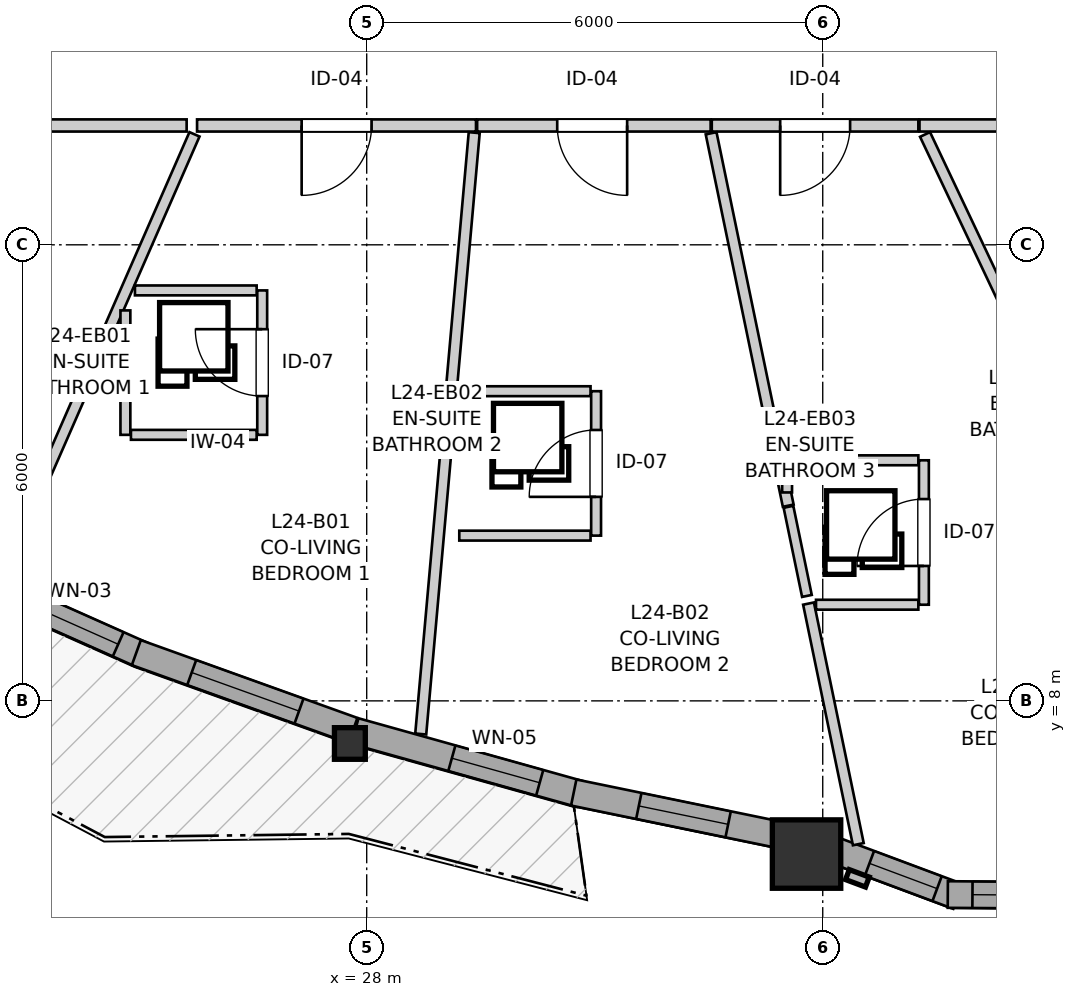
"""IFC4 building model, lengths in metres.
Left out: names, types, materials, properties, quantities, classifications, styles, units other than length and angle.
Written with IfcOpenShell. Run it as: python <this file> out.ifc"""

import sys

from ifc_helpers import new_model, si_unit, direction, frame, frame_2d, origin, origin_2d, place, context, subcontext, project, spatial, rectangle, i_section, extrude, source, transform, mapped, element, fill, save


model = new_model("IFC4")
c1 = context("Model", 3, precision=1e-05, world=origin(), true_north=direction((0.0, 1.0)))
c2 = subcontext(c1, "Body", "Model", "MODEL_VIEW")
j1 = project(units=[si_unit("LENGTHUNIT", "METRE"), si_unit("PLANEANGLEUNIT", "RADIAN")], contexts=[c1])
p1 = place(None, origin())
s1 = spatial("IfcSite", under=j1, at=p1, CompositionType="ELEMENT")
p2 = place(p1, origin())
s2 = spatial("IfcBuilding", under=s1, at=p2, CompositionType="ELEMENT")
p3 = place(p2, frame((0.0, 0.0, 83.2)))
s3 = spatial("IfcBuildingStorey", under=s2, at=p3, CompositionType="ELEMENT", Elevation=83.2)
m1 = source(origin(), c2, "Body", "SweptSolid", [
    extrude(i_section(OverallWidth=0.406, OverallDepth=0.416, WebThickness=0.027, FlangeThickness=0.044, FilletRadius=0.015, at=origin_2d()), origin(), (0.0, 0.0, 1.0), 2.935),
])
p4 = place(p3, frame((27.779, 7.439, 0.0), z_axis=(0.0, 0.0, 1.0), x_axis=(1.0, 0.0, 0.0)))
e1 = element("IfcColumn", 1, at=p4, inside=s3, PredefinedType="PILASTER", context=c2, shape_type="MappedRepresentation", body=[
    mapped(m1, transform((0.0, 0.0, 0.0), x_axis=(1.0, 0.0, 0.0), y_axis=(0.0, 1.0, 0.0), z_axis=(0.0, 0.0, 1.0), scale=1.0)),
])
m2 = source(origin(), c2, "Body", "SweptSolid", [
    extrude(rectangle(XDim=0.9, YDim=0.9, at=origin_2d()), origin(), (0.0, 0.0, 1.0), 2.935),
])
p5 = place(p3, frame((33.787, 5.985, 0.0), z_axis=(0.0, 0.0, 1.0), x_axis=(1.0, 0.0, 0.0)))
e2 = element("IfcColumn", 2, at=p5, inside=s3, PredefinedType="COLUMN", context=c2, shape_type="MappedRepresentation", body=[
    mapped(m2, transform((0.0, 0.0, 0.0), x_axis=(1.0, 0.0, 0.0), y_axis=(0.0, 1.0, 0.0), z_axis=(0.0, 0.0, 1.0), scale=1.0)),
])
p6 = place(p3, frame((22.503, 9.737, 0.0), z_axis=(0.0, 0.0, 1.0), x_axis=(0.913443049169, -0.406966578388, 0.0)))
e3 = element("IfcWall", 3, at=p6, inside=s3, PredefinedType="SOLIDWALL", context=c2, shape_type="SweptSolid", body=[
    extrude(rectangle(XDim=2.79, YDim=0.35, at=frame_2d((1.395, 0.0))), origin(), (0.0, 0.0, 1.0), 2.465),
])
p7 = place(p6, frame((0.938, 0.0, 0.82)))
e4 = element("IfcOpeningElement", 4, at=p7, cuts=e3, PredefinedType="OPENING", context=c2, shape_type="SweptSolid", body=[
    extrude(rectangle(XDim=1.5, YDim=1.45, at=frame_2d((0.75, 0.725))), frame((0.0, 0.185, 0.0), z_axis=(0.0, -1.0, 0.0), x_axis=(1.0, 0.0, 0.0)), (0.0, 0.0, 1.0), 0.37),
])
p8 = place(p3, frame((24.969, 8.635, 0.0), z_axis=(0.0, 0.0, 1.0), x_axis=(0.941099972293, -0.338128440315, 0.0)))
e5 = element("IfcWall", 5, at=p8, inside=s3, PredefinedType="SOLIDWALL", context=c2, shape_type="SweptSolid", body=[
    extrude(rectangle(XDim=3.028, YDim=0.35, at=frame_2d((1.514, 0.0))), origin(), (0.0, 0.0, 1.0), 2.465),
])
p9 = place(p8, frame((0.774, 0.0, 0.82)))
e6 = element("IfcOpeningElement", 6, at=p9, cuts=e5, PredefinedType="OPENING", context=c2, shape_type="SweptSolid", body=[
    extrude(rectangle(XDim=1.5, YDim=1.45, at=frame_2d((0.75, 0.725))), frame((0.0, 0.185, 0.0), z_axis=(0.0, -1.0, 0.0), x_axis=(1.0, 0.0, 0.0)), (0.0, 0.0, 1.0), 0.37),
])
p10 = place(p3, frame((27.845, 7.603, 0.0), z_axis=(0.0, 0.0, 1.0), x_axis=(0.963041412051, -0.269353371382, 0.0)))
e7 = element("IfcWall", 7, at=p10, inside=s3, PredefinedType="SOLIDWALL", context=c2, shape_type="SweptSolid", body=[
    extrude(rectangle(XDim=3.078, YDim=0.35, at=frame_2d((1.539, 0.0))), origin(), (0.0, 0.0, 1.0), 2.465),
])
p11 = place(p10, frame((1.324, 0.0, 0.82)))
e8 = element("IfcOpeningElement", 8, at=p11, cuts=e7, PredefinedType="OPENING", context=c2, shape_type="SweptSolid", body=[
    extrude(rectangle(XDim=1.2, YDim=1.45, at=frame_2d((0.6, 0.725))), frame((0.0, 0.185, 0.0), z_axis=(0.0, -1.0, 0.0), x_axis=(1.0, 0.0, 0.0)), (0.0, 0.0, 1.0), 0.37),
])
p12 = place(p3, frame((30.724, 6.794, 0.0), z_axis=(0.0, 0.0, 1.0), x_axis=(0.979439663571, -0.201737317878, 0.0)))
e9 = element("IfcWall", 9, at=p12, inside=s3, PredefinedType="SOLIDWALL", context=c2, shape_type="SweptSolid", body=[
    extrude(rectangle(XDim=2.938, YDim=0.35, at=frame_2d((1.469, 0.0))), origin(), (0.0, 0.0, 1.0), 2.465),
])
p13 = place(p12, frame((0.874, 0.0, 0.82)))
e10 = element("IfcOpeningElement", 10, at=p13, cuts=e9, PredefinedType="OPENING", context=c2, shape_type="SweptSolid", body=[
    extrude(rectangle(XDim=1.2, YDim=1.45, at=frame_2d((0.6, 0.725))), frame((0.0, 0.185, 0.0), z_axis=(0.0, -1.0, 0.0), x_axis=(1.0, 0.0, 0.0)), (0.0, 0.0, 1.0), 0.37),
])
p14 = place(p3, frame((34.059, 6.07, 0.0), z_axis=(0.0, 0.0, 1.0), x_axis=(0.936803747811, -0.349855310219, 0.0)))
e11 = element("IfcWall", 11, at=p14, inside=s3, PredefinedType="SOLIDWALL", context=c2, shape_type="SweptSolid", body=[
    extrude(rectangle(XDim=1.836, YDim=0.35, at=frame_2d((0.918, 0.0))), origin(), (0.0, 0.0, 1.0), 2.465),
])
p15 = place(p14, frame((0.593, 0.0, 0.82)))
e12 = element("IfcOpeningElement", 12, at=p15, cuts=e11, PredefinedType="OPENING", context=c2, shape_type="SweptSolid", body=[
    extrude(rectangle(XDim=0.95, YDim=1.35, at=frame_2d((0.475, 0.675))), frame((0.0, 0.185, 0.0), z_axis=(0.0, -1.0, 0.0), x_axis=(1.0, 0.0, 0.0)), (0.0, 0.0, 1.0), 0.37),
])
p16 = place(p3, frame((35.646, 5.452, 0.0), z_axis=(0.0, 0.0, 1.0), x_axis=(0.999976451414, -0.006862697526, 0.0)))
e13 = element("IfcWall", 13, at=p16, inside=s3, PredefinedType="SOLIDWALL", context=c2, shape_type="SweptSolid", body=[
    extrude(rectangle(XDim=2.099, YDim=0.35, at=frame_2d((1.049, 0.0))), origin(), (0.0, 0.0, 1.0), 2.465),
])
p17 = place(p16, frame((0.324, 0.0, 0.82)))
e14 = element("IfcOpeningElement", 14, at=p17, cuts=e13, PredefinedType="OPENING", context=c2, shape_type="SweptSolid", body=[
    extrude(rectangle(XDim=1.45, YDim=1.25, at=frame_2d((0.725, 0.625))), frame((0.0, 0.185, 0.0), z_axis=(0.0, -1.0, 0.0), x_axis=(1.0, 0.0, 0.0)), (0.0, 0.0, 1.0), 0.37),
])
p18 = place(p3, frame((29.438, 15.57, 0.0), z_axis=(0.0, 0.0, 1.0), x_axis=(-1.0, 0.0, 0.0)))
e15 = element("IfcWall", 15, at=p18, inside=s3, PredefinedType="PARTITIONING", context=c2, shape_type="SweptSolid", body=[
    extrude(rectangle(XDim=3.67, YDim=0.16, at=frame_2d((1.835, 0.0))), origin(), (0.0, 0.0, 1.0), 2.935),
])
p19 = place(p18, frame((1.374, 0.0, 0.0)))
e16 = element("IfcOpeningElement", 16, at=p19, cuts=e15, PredefinedType="OPENING", context=c2, shape_type="SweptSolid", body=[
    extrude(rectangle(XDim=0.92, YDim=2.1, at=frame_2d((0.46, 1.05))), frame((0.0, 0.09, 0.0), z_axis=(0.0, -1.0, 0.0), x_axis=(1.0, 0.0, 0.0)), (0.0, 0.0, 1.0), 0.18),
])
p20 = place(p3, frame((38.53, 15.57, 0.0), z_axis=(0.0, 0.0, 1.0), x_axis=(-1.0, 0.0, 0.0)))
e17 = element("IfcWall", 17, at=p20, inside=s3, PredefinedType="PARTITIONING", context=c2, shape_type="SweptSolid", body=[
    extrude(rectangle(XDim=3.257, YDim=0.16, at=frame_2d((1.628, 0.0))), origin(), (0.0, 0.0, 1.0), 2.935),
])
p21 = place(p20, frame((1.16, 0.0, 0.0)))
e18 = element("IfcOpeningElement", 18, at=p21, cuts=e17, PredefinedType="OPENING", context=c2, shape_type="SweptSolid", body=[
    extrude(rectangle(XDim=0.92, YDim=2.1, at=frame_2d((0.46, 1.05))), frame((0.0, 0.09, 0.0), z_axis=(0.0, -1.0, 0.0), x_axis=(1.0, 0.0, 0.0)), (0.0, 0.0, 1.0), 0.18),
])
p22 = place(p3, frame((32.525, 15.57, 0.0), z_axis=(0.0, 0.0, 1.0), x_axis=(-1.0, 0.0, 0.0)))
e19 = element("IfcWall", 19, at=p22, inside=s3, PredefinedType="PARTITIONING", context=c2, shape_type="SweptSolid", body=[
    extrude(rectangle(XDim=3.072, YDim=0.16, at=frame_2d((1.536, 0.0))), origin(), (0.0, 0.0, 1.0), 2.935),
])
p23 = place(p22, frame((1.098, 0.0, 0.0)))
e20 = element("IfcOpeningElement", 20, at=p23, cuts=e19, PredefinedType="OPENING", context=c2, shape_type="SweptSolid", body=[
    extrude(rectangle(XDim=0.92, YDim=2.1, at=frame_2d((0.46, 1.05))), frame((0.0, 0.09, 0.0), z_axis=(0.0, -1.0, 0.0), x_axis=(1.0, 0.0, 0.0)), (0.0, 0.0, 1.0), 0.18),
])
p24 = place(p3, frame((35.258, 15.57, 0.0), z_axis=(0.0, 0.0, 1.0), x_axis=(-1.0, 0.0, 0.0)))
e21 = element("IfcWall", 21, at=p24, inside=s3, PredefinedType="PARTITIONING", context=c2, shape_type="SweptSolid", body=[
    extrude(rectangle(XDim=2.718, YDim=0.16, at=frame_2d((1.359, 0.0))), origin(), (0.0, 0.0, 1.0), 2.935),
])
p25 = place(p24, frame((0.898, 0.0, 0.0)))
e22 = element("IfcOpeningElement", 22, at=p25, cuts=e21, PredefinedType="OPENING", context=c2, shape_type="SweptSolid", body=[
    extrude(rectangle(XDim=0.92, YDim=2.1, at=frame_2d((0.46, 1.05))), frame((0.0, 0.09, 0.0), z_axis=(0.0, -1.0, 0.0), x_axis=(1.0, 0.0, 0.0)), (0.0, 0.0, 1.0), 0.18),
])
p26 = place(p3, frame((26.625, 11.5, 0.0), z_axis=(0.0, 0.0, 1.0), x_axis=(0.0, 1.0, 0.0)))
e23 = element("IfcWall", 23, at=p26, inside=s3, PredefinedType="PARTITIONING", context=c2, shape_type="SweptSolid", body=[
    extrude(rectangle(XDim=1.9, YDim=0.13, at=frame_2d((0.95, 0.0))), origin(), (0.0, 0.0, 1.0), 2.935),
])
p27 = place(p26, frame((0.51, 0.0, 0.0)))
e24 = element("IfcOpeningElement", 24, at=p27, cuts=e23, PredefinedType="OPENING", context=c2, shape_type="SweptSolid", body=[
    extrude(rectangle(XDim=0.88, YDim=2.05, at=frame_2d((0.44, 1.025))), frame((0.0, 0.075, 0.0), z_axis=(0.0, -1.0, 0.0), x_axis=(1.0, 0.0, 0.0)), (0.0, 0.0, 1.0), 0.15),
])
p28 = place(p3, frame((31.018, 10.174, 0.0), z_axis=(0.0, 0.0, 1.0), x_axis=(0.0, 1.0, 0.0)))
e25 = element("IfcWall", 25, at=p28, inside=s3, PredefinedType="PARTITIONING", context=c2, shape_type="SweptSolid", body=[
    extrude(rectangle(XDim=1.9, YDim=0.13, at=frame_2d((0.95, 0.0))), origin(), (0.0, 0.0, 1.0), 2.935),
])
p29 = place(p28, frame((0.51, 0.0, 0.0)))
e26 = element("IfcOpeningElement", 26, at=p29, cuts=e25, PredefinedType="OPENING", context=c2, shape_type="SweptSolid", body=[
    extrude(rectangle(XDim=0.88, YDim=2.05, at=frame_2d((0.44, 1.025))), frame((0.0, 0.075, 0.0), z_axis=(0.0, -1.0, 0.0), x_axis=(1.0, 0.0, 0.0)), (0.0, 0.0, 1.0), 0.15),
])
p30 = place(p3, frame((35.331, 9.265, 0.0), z_axis=(0.0, 0.0, 1.0), x_axis=(0.0, 1.0, 0.0)))
e27 = element("IfcWall", 27, at=p30, inside=s3, PredefinedType="PARTITIONING", context=c2, shape_type="SweptSolid", body=[
    extrude(rectangle(XDim=1.9, YDim=0.13, at=frame_2d((0.95, 0.0))), origin(), (0.0, 0.0, 1.0), 2.935),
])
p31 = place(p30, frame((0.51, 0.0, 0.0)))
e28 = element("IfcOpeningElement", 28, at=p31, cuts=e27, PredefinedType="OPENING", context=c2, shape_type="SweptSolid", body=[
    extrude(rectangle(XDim=0.88, YDim=2.05, at=frame_2d((0.44, 1.025))), frame((0.0, 0.075, 0.0), z_axis=(0.0, -1.0, 0.0), x_axis=(1.0, 0.0, 0.0)), (0.0, 0.0, 1.0), 0.15),
])
p32 = place(p3, frame((28.711, 7.564, 0.0), z_axis=(0.0, 0.0, 1.0), x_axis=(0.088615013812, 0.996065951294, 0.0)))
e29 = element("IfcWall", 29, at=p32, inside=s3, PredefinedType="PARTITIONING", context=c2, shape_type="SweptSolid", body=[
    extrude(rectangle(XDim=7.943, YDim=0.145, at=frame_2d((3.971, 0.0))), origin(), (0.0, 0.0, 1.0), 2.935),
])
p33 = place(p3, frame((23.186, 9.634, 0.0), z_axis=(0.0, 0.0, 1.0), x_axis=(0.400994208685, 0.916080588486, 0.0)))
e30 = element("IfcWall", 30, at=p33, inside=s3, PredefinedType="PARTITIONING", context=c2, shape_type="SweptSolid", body=[
    extrude(rectangle(XDim=6.353, YDim=0.145, at=frame_2d((3.177, 0.0))), origin(), (0.0, 0.0, 1.0), 2.935),
])
p34 = place(p3, frame((32.531, 15.468, 0.0), z_axis=(0.0, 0.0, 1.0), x_axis=(0.202792769077, -0.979221677053, 0.0)))
e31 = element("IfcWall", 31, at=p34, inside=s3, PredefinedType="PARTITIONING", context=c2, shape_type="SweptSolid", body=[
    extrude(rectangle(XDim=5.003, YDim=0.145, at=frame_2d((2.502, 0.0))), origin(), (0.0, 0.0, 1.0), 2.935),
])
p35 = place(p3, frame((35.346, 15.452, 0.0), z_axis=(0.0, 0.0, 1.0), x_axis=(0.428023015228, -0.903767834366, 0.0)))
e32 = element("IfcWall", 32, at=p35, inside=s3, PredefinedType="PARTITIONING", context=c2, shape_type="SweptSolid", body=[
    extrude(rectangle(XDim=4.64, YDim=0.145, at=frame_2d((2.32, 0.0))), origin(), (0.0, 0.0, 1.0), 2.935),
])
p36 = place(p3, frame((22.258, 15.57, 0.0), z_axis=(0.0, 0.0, 1.0), x_axis=(1.0, 0.0, 0.0)))
e33 = element("IfcWall", 33, at=p36, inside=s3, PredefinedType="PARTITIONING", context=c2, shape_type="SweptSolid", body=[
    extrude(rectangle(XDim=3.373, YDim=0.16, at=frame_2d((1.687, 0.0))), origin(), (0.0, 0.0, 1.0), 2.935),
])
p37 = place(p3, frame((33.813, 9.28, 0.0), z_axis=(0.0, 0.0, 1.0), x_axis=(0.202648062782, -0.979251633979, 0.0)))
e34 = element("IfcWall", 34, at=p37, inside=s3, PredefinedType="PARTITIONING", context=c2, shape_type="SweptSolid", body=[
    extrude(rectangle(XDim=3.232, YDim=0.145, at=frame_2d((1.616, 0.0))), origin(), (0.0, 0.0, 1.0), 2.935),
])
p38 = place(p3, frame((24.825, 11.5, 0.0), z_axis=(0.0, 0.0, 1.0), x_axis=(0.0, 1.0, 0.0)))
e35 = element("IfcWall", 35, at=p38, inside=s3, PredefinedType="PARTITIONING", context=c2, shape_type="SweptSolid", body=[
    extrude(rectangle(XDim=1.637, YDim=0.13, at=frame_2d((0.818, 0.0))), origin(), (0.0, 0.0, 1.0), 2.935),
])
p39 = place(p3, frame((33.626, 11.165, 0.0), z_axis=(0.0, 0.0, 1.0), x_axis=(1.0, 0.0, 0.0)))
e36 = element("IfcWall", 36, at=p39, inside=s3, PredefinedType="PARTITIONING", context=c2, shape_type="SweptSolid", body=[
    extrude(rectangle(XDim=1.632, YDim=0.13, at=frame_2d((0.816, 0.0))), origin(), (0.0, 0.0, 1.0), 2.935),
])
p40 = place(p3, frame((24.898, 11.5, 0.0), z_axis=(0.0, 0.0, 1.0), x_axis=(1.0, 0.0, 0.0)))
e37 = element("IfcWall", 37, at=p40, inside=s3, PredefinedType="PARTITIONING", context=c2, shape_type="SweptSolid", body=[
    extrude(rectangle(XDim=1.654, YDim=0.13, at=frame_2d((0.827, 0.0))), origin(), (0.0, 0.0, 1.0), 2.543),
])
p41 = place(p3, frame((29.305, 12.074, 0.0), z_axis=(0.0, 0.0, 1.0), x_axis=(1.0, 0.0, 0.0)))
e38 = element("IfcWall", 38, at=p41, inside=s3, PredefinedType="PARTITIONING", context=c2, shape_type="SweptSolid", body=[
    extrude(rectangle(XDim=1.64, YDim=0.13, at=frame_2d((0.82, 0.0))), origin(), (0.0, 0.0, 1.0), 2.935),
])
p42 = place(p3, frame((29.218, 10.174, 0.0), z_axis=(0.0, 0.0, 1.0), x_axis=(1.0, 0.0, 0.0)))
e39 = element("IfcWall", 39, at=p42, inside=s3, PredefinedType="PARTITIONING", context=c2, shape_type="SweptSolid", body=[
    extrude(rectangle(XDim=1.727, YDim=0.13, at=frame_2d((0.864, 0.0))), origin(), (0.0, 0.0, 1.0), 2.543),
])
p43 = place(p3, frame((24.951, 13.4, 0.0), z_axis=(0.0, 0.0, 1.0), x_axis=(1.0, 0.0, 0.0)))
e40 = element("IfcWall", 40, at=p43, inside=s3, PredefinedType="PARTITIONING", context=c2, shape_type="SweptSolid", body=[
    extrude(rectangle(XDim=1.601, YDim=0.13, at=frame_2d((0.801, 0.0))), origin(), (0.0, 0.0, 1.0), 2.935),
])
p44 = place(p3, frame((33.912, 9.265, 0.0), z_axis=(0.0, 0.0, 1.0), x_axis=(1.0, 0.0, 0.0)))
e41 = element("IfcWall", 41, at=p44, inside=s3, PredefinedType="PARTITIONING", context=c2, shape_type="SweptSolid", body=[
    extrude(rectangle(XDim=1.346, YDim=0.13, at=frame_2d((0.673, 0.0))), origin(), (0.0, 0.0, 1.0), 2.935),
])
p45 = place(p3, frame((33.549, 10.553, 0.0), z_axis=(0.0, 0.0, 1.0), x_axis=(0.202855035592, -0.97920877985, 0.0)))
e42 = element("IfcWall", 42, at=p45, inside=s3, PredefinedType="PARTITIONING", context=c2, shape_type="SweptSolid", body=[
    extrude(rectangle(XDim=1.198, YDim=0.13, at=frame_2d((0.599, 0.0))), origin(), (0.0, 0.0, 1.0), 2.935),
])
p46 = place(p3, frame((33.531, 10.742, 0.0), z_axis=(0.0, 0.0, 1.0), x_axis=(0.0, 1.0, 0.0)))
e43 = element("IfcWall", 43, at=p46, inside=s3, PredefinedType="PARTITIONING", context=c2, shape_type="SweptSolid", body=[
    extrude(rectangle(XDim=0.35, YDim=0.13, at=frame_2d((0.175, 0.0))), origin(), (0.0, 0.0, 1.0), 2.935),
])
m3 = source(origin(), c2, "Body", "SweptSolid", [
    extrude(rectangle(XDim=1.5, YDim=1.45, at=frame_2d((0.75, 0.725))), frame((0.0, 0.03, 0.0), z_axis=(0.0, -1.0, 0.0), x_axis=(1.0, 0.0, 0.0)), (0.0, 0.0, 1.0), 0.06),
])
p47 = place(p7, origin())
e44 = element("IfcWindow", 44, at=p47, inside=s3, PartitioningType="SINGLE_PANEL", PredefinedType="WINDOW", context=c2, shape_type="MappedRepresentation", body=[
    mapped(m3, transform((0.0, 0.0, 0.0), x_axis=(1.0, 0.0, 0.0), y_axis=(0.0, 1.0, 0.0), z_axis=(0.0, 0.0, 1.0), scale=1.0)),
])
fill(e4, e44)
p48 = place(p9, origin())
e45 = element("IfcWindow", 45, at=p48, inside=s3, PartitioningType="SINGLE_PANEL", PredefinedType="WINDOW", context=c2, shape_type="MappedRepresentation", body=[
    mapped(m3, transform((0.0, 0.0, 0.0), x_axis=(1.0, 0.0, 0.0), y_axis=(0.0, 1.0, 0.0), z_axis=(0.0, 0.0, 1.0), scale=1.0)),
])
fill(e6, e45)
m4 = source(origin(), c2, "Body", "SweptSolid", [
    extrude(rectangle(XDim=1.2, YDim=1.45, at=frame_2d((0.6, 0.725))), frame((0.0, 0.03, 0.0), z_axis=(0.0, -1.0, 0.0), x_axis=(1.0, 0.0, 0.0)), (0.0, 0.0, 1.0), 0.06),
])
p49 = place(p11, origin())
e46 = element("IfcWindow", 46, at=p49, inside=s3, PartitioningType="SINGLE_PANEL", PredefinedType="WINDOW", context=c2, shape_type="MappedRepresentation", body=[
    mapped(m4, transform((0.0, 0.0, 0.0), x_axis=(1.0, 0.0, 0.0), y_axis=(0.0, 1.0, 0.0), z_axis=(0.0, 0.0, 1.0), scale=1.0)),
])
fill(e8, e46)
p50 = place(p13, origin())
e47 = element("IfcWindow", 47, at=p50, inside=s3, PartitioningType="SINGLE_PANEL", PredefinedType="WINDOW", context=c2, shape_type="MappedRepresentation", body=[
    mapped(m4, transform((0.0, 0.0, 0.0), x_axis=(1.0, 0.0, 0.0), y_axis=(0.0, 1.0, 0.0), z_axis=(0.0, 0.0, 1.0), scale=1.0)),
])
fill(e10, e47)
m5 = source(origin(), c2, "Body", "SweptSolid", [
    extrude(rectangle(XDim=0.95, YDim=1.35, at=frame_2d((0.475, 0.675))), frame((0.0, 0.03, 0.0), z_axis=(0.0, -1.0, 0.0), x_axis=(1.0, 0.0, 0.0)), (0.0, 0.0, 1.0), 0.06),
])
p51 = place(p15, origin())
e48 = element("IfcWindow", 48, at=p51, inside=s3, PartitioningType="SINGLE_PANEL", PredefinedType="WINDOW", context=c2, shape_type="MappedRepresentation", body=[
    mapped(m5, transform((0.0, 0.0, 0.0), x_axis=(1.0, 0.0, 0.0), y_axis=(0.0, 1.0, 0.0), z_axis=(0.0, 0.0, 1.0), scale=1.0)),
])
fill(e12, e48)
m6 = source(origin(), c2, "Body", "SweptSolid", [
    extrude(rectangle(XDim=1.45, YDim=1.25, at=frame_2d((0.725, 0.625))), frame((0.0, 0.03, 0.0), z_axis=(0.0, -1.0, 0.0), x_axis=(1.0, 0.0, 0.0)), (0.0, 0.0, 1.0), 0.06),
])
p52 = place(p17, origin())
e49 = element("IfcWindow", 49, at=p52, inside=s3, PartitioningType="SINGLE_PANEL", PredefinedType="WINDOW", context=c2, shape_type="MappedRepresentation", body=[
    mapped(m6, transform((0.0, 0.0, 0.0), x_axis=(1.0, 0.0, 0.0), y_axis=(0.0, 1.0, 0.0), z_axis=(0.0, 0.0, 1.0), scale=1.0)),
])
fill(e14, e49)
m7 = source(origin(), c2, "Body", "SweptSolid", [
    extrude(rectangle(XDim=0.92, YDim=2.1, at=frame_2d((0.46, 1.05))), frame((0.0, 0.025, 0.0), z_axis=(0.0, -1.0, 0.0), x_axis=(1.0, 0.0, 0.0)), (0.0, 0.0, 1.0), 0.05),
])
p53 = place(p19, origin())
e50 = element("IfcDoor", 50, at=p53, inside=s3, OperationType="SINGLE_SWING_RIGHT", PredefinedType="DOOR", context=c2, shape_type="MappedRepresentation", body=[
    mapped(m7, transform((0.0, 0.0, 0.0), x_axis=(1.0, 0.0, 0.0), y_axis=(0.0, 1.0, 0.0), z_axis=(0.0, 0.0, 1.0), scale=1.0)),
])
fill(e16, e50)
p54 = place(p23, origin())
e51 = element("IfcDoor", 51, at=p54, inside=s3, OperationType="SINGLE_SWING_LEFT", PredefinedType="DOOR", context=c2, shape_type="MappedRepresentation", body=[
    mapped(m7, transform((0.0, 0.0, 0.0), x_axis=(1.0, 0.0, 0.0), y_axis=(0.0, 1.0, 0.0), z_axis=(0.0, 0.0, 1.0), scale=1.0)),
])
fill(e20, e51)
p55 = place(p25, origin())
e52 = element("IfcDoor", 52, at=p55, inside=s3, OperationType="SINGLE_SWING_RIGHT", PredefinedType="DOOR", context=c2, shape_type="MappedRepresentation", body=[
    mapped(m7, transform((0.0, 0.0, 0.0), x_axis=(1.0, 0.0, 0.0), y_axis=(0.0, 1.0, 0.0), z_axis=(0.0, 0.0, 1.0), scale=1.0)),
])
fill(e22, e52)
m8 = source(origin(), c2, "Body", "SweptSolid", [
    extrude(rectangle(XDim=0.88, YDim=2.05, at=frame_2d((0.44, 1.025))), frame((0.0, 0.025, 0.0), z_axis=(0.0, -1.0, 0.0), x_axis=(1.0, 0.0, 0.0)), (0.0, 0.0, 1.0), 0.05),
])
p56 = place(p27, origin())
e53 = element("IfcDoor", 53, at=p56, inside=s3, OperationType="SINGLE_SWING_RIGHT", PredefinedType="DOOR", context=c2, shape_type="MappedRepresentation", body=[
    mapped(m8, transform((0.0, 0.0, 0.0), x_axis=(1.0, 0.0, 0.0), y_axis=(0.0, 1.0, 0.0), z_axis=(0.0, 0.0, 1.0), scale=1.0)),
])
fill(e24, e53)
p57 = place(p29, origin())
e54 = element("IfcDoor", 54, at=p57, inside=s3, OperationType="SINGLE_SWING_LEFT", PredefinedType="DOOR", context=c2, shape_type="MappedRepresentation", body=[
    mapped(m8, transform((0.0, 0.0, 0.0), x_axis=(1.0, 0.0, 0.0), y_axis=(0.0, 1.0, 0.0), z_axis=(0.0, 0.0, 1.0), scale=1.0)),
])
fill(e26, e54)
p58 = place(p31, origin())
e55 = element("IfcDoor", 55, at=p58, inside=s3, OperationType="SINGLE_SWING_LEFT", PredefinedType="DOOR", context=c2, shape_type="MappedRepresentation", body=[
    mapped(m8, transform((0.0, 0.0, 0.0), x_axis=(1.0, 0.0, 0.0), y_axis=(0.0, 1.0, 0.0), z_axis=(0.0, 0.0, 1.0), scale=1.0)),
])
fill(e28, e55)
save(model, sys.argv[1])
